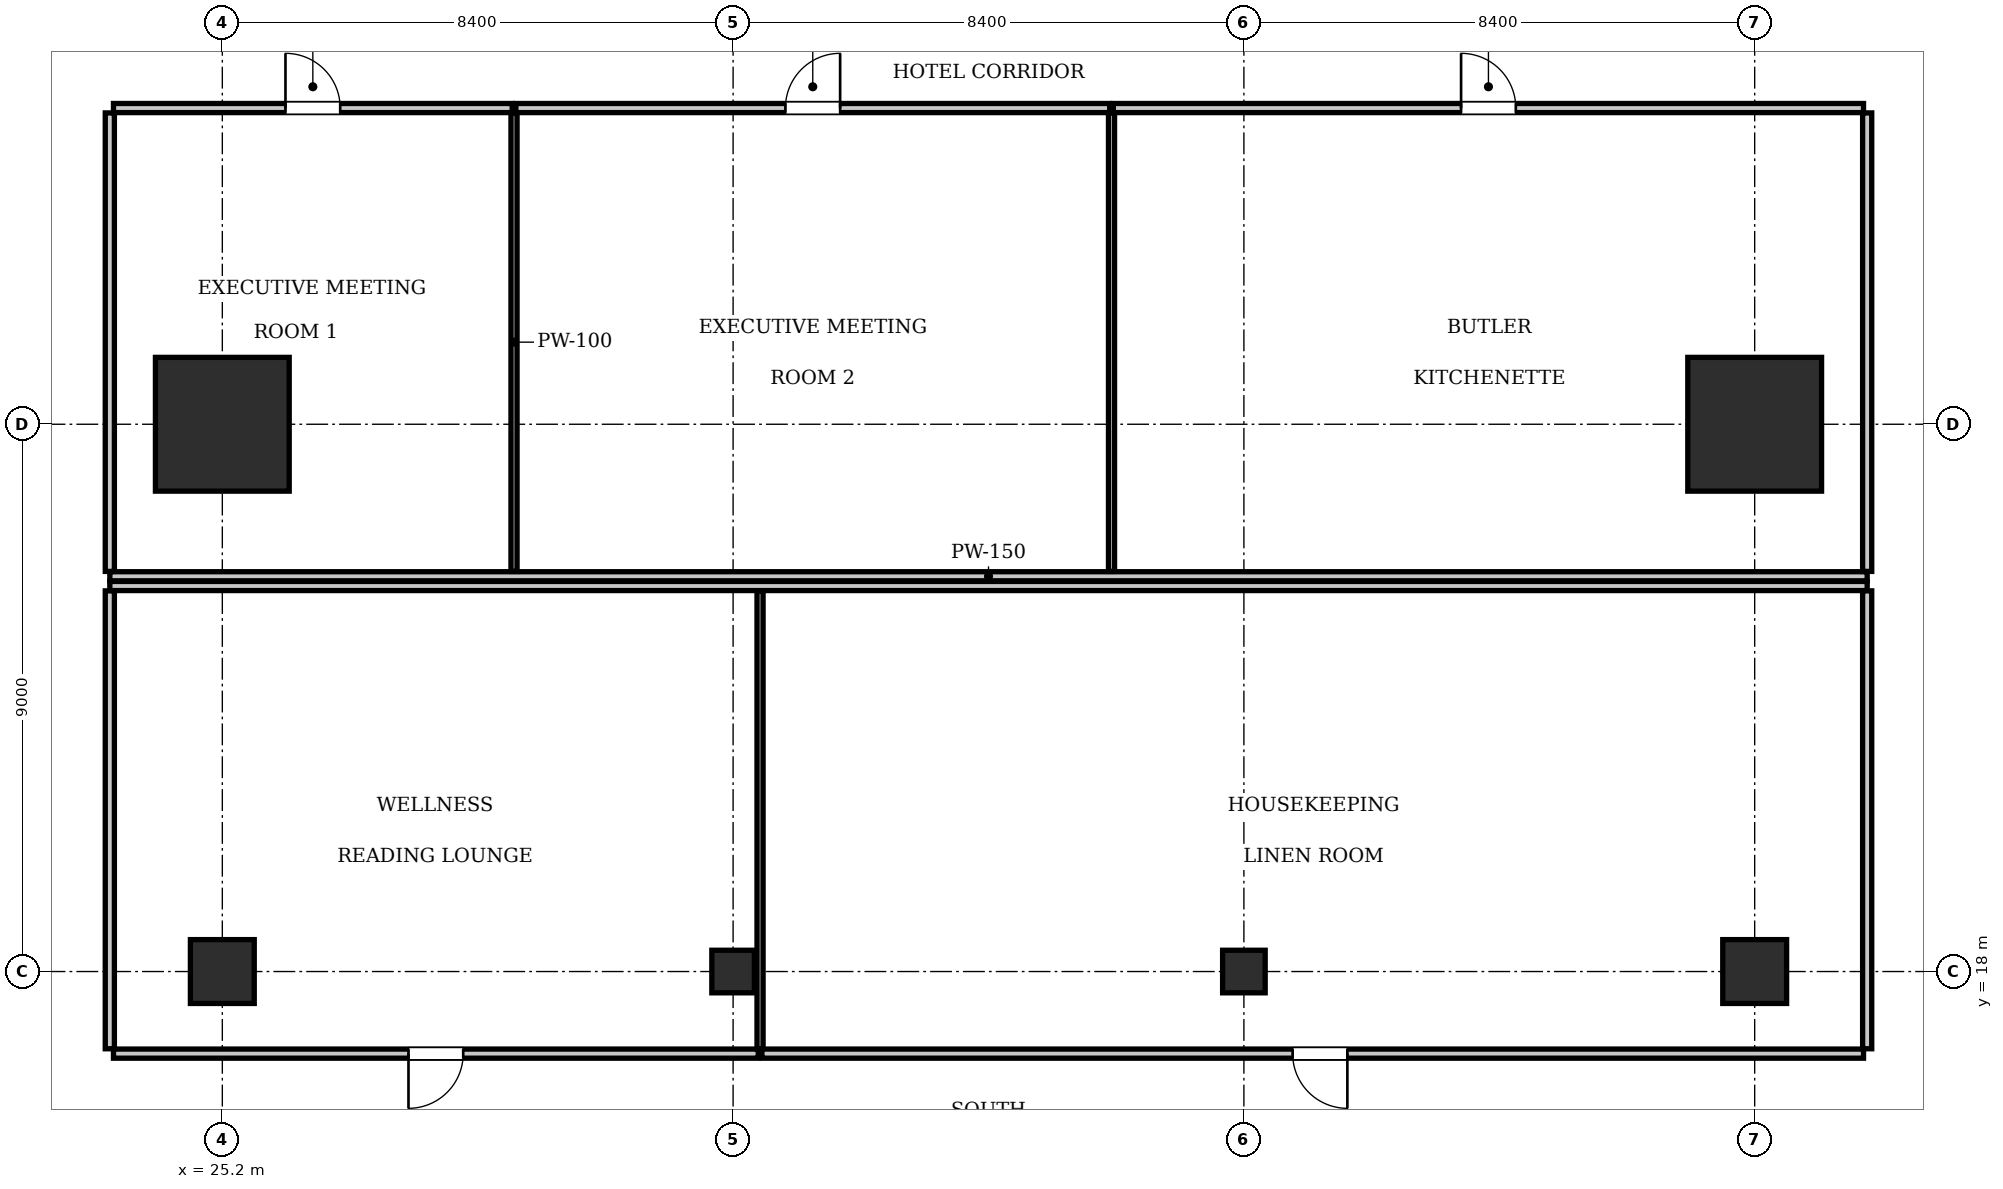
"""IFC4 building model, lengths in metres.
Left out: names, types, materials, properties, quantities, classifications, styles, units other than length and angle.
Written with IfcOpenShell. Run it as: python <this file> out.ifc"""

import sys

from ifc_helpers import new_model, si_unit, direction, frame, frame_2d, origin, origin_2d, place, context, subcontext, project, spatial, rectangle, i_section, extrude, element, fill, save


model = new_model("IFC4")
c1 = context("Model", 3, precision=1e-05, world=origin(), true_north=direction((0.0, 1.0)))
c2 = subcontext(c1, "Body", "Model", "MODEL_VIEW")
j1 = project(units=[si_unit("LENGTHUNIT", "METRE"), si_unit("PLANEANGLEUNIT", "RADIAN")], contexts=[c1])
p1 = place(None, origin())
s1 = spatial("IfcSite", under=j1, at=p1, CompositionType="ELEMENT")
p2 = place(p1, origin())
s2 = spatial("IfcBuilding", under=s1, at=p2, CompositionType="ELEMENT")
p3 = place(p2, frame((0.0, 0.0, 46.2)))
s3 = spatial("IfcBuildingStorey", under=s2, at=p3, CompositionType="ELEMENT", Elevation=46.2)
for number, where, z_axis, x_axis in (
    (1, (25.2, 27.0, 0.0), (0.0, 0.0, 1.0), (1.0, 0.0, 0.0)),
    (2, (50.4, 27.0, 0.0), (0.0, 0.0, 1.0), (1.0, 0.0, 0.0)),
):
    element("IfcColumn", number, at=place(p3, frame(where, z_axis=z_axis, x_axis=x_axis)), inside=s3, PredefinedType="COLUMN", context=c2, shape_type="SweptSolid", body=[
        extrude(rectangle(XDim=2.2, YDim=2.2, at=origin_2d()), origin(), (0.0, 0.0, 1.0), 3.85),
    ])
for number, where, z_axis, x_axis in (
    (3, (25.2, 18.0, 0.0), (0.0, 0.0, 1.0), (1.0, 0.0, 0.0)),
    (4, (50.4, 18.0, 0.0), (0.0, 0.0, 1.0), (1.0, 0.0, 0.0)),
):
    element("IfcColumn", number, at=place(p3, frame(where, z_axis=z_axis, x_axis=x_axis)), inside=s3, PredefinedType="COLUMN", context=c2, shape_type="SweptSolid", body=[
        extrude(rectangle(XDim=1.05, YDim=1.05, at=origin_2d()), origin(), (0.0, 0.0, 1.0), 3.85),
    ])
for number, where, z_axis, x_axis in (
    (5, (33.6, 18.0, 0.0), (0.0, 0.0, 1.0), (1.0, 0.0, 0.0)),
    (6, (42.0, 18.0, 0.0), (0.0, 0.0, 1.0), (1.0, 0.0, 0.0)),
):
    element("IfcColumn", number, at=place(p3, frame(where, z_axis=z_axis, x_axis=x_axis)), inside=s3, PredefinedType="COLUMN", context=c2, shape_type="SweptSolid", body=[
        extrude(i_section(OverallWidth=0.7, OverallDepth=0.7, WebThickness=0.028, FlangeThickness=0.044, at=origin_2d()), origin(), (0.0, 0.0, 1.0), 3.85),
    ])
p4 = place(p3, frame((23.35, 24.5, 0.0), z_axis=(0.0, 0.0, 1.0), x_axis=(1.0, 0.0, 0.0)))
e7 = element("IfcWall", 7, at=p4, inside=s3, PredefinedType="PARTITIONING", context=c2, shape_type="SweptSolid", body=[
    extrude(rectangle(XDim=28.9, YDim=0.15, at=frame_2d((14.45, 0.0))), origin(), (0.0, 0.0, 1.0), 3.61),
])
for number, where, z_axis, x_axis in (
    (8, (23.35, 24.58, 0.0), (0.0, 0.0, 1.0), (0.0, 1.0, 0.0)),
    (9, (52.25, 24.58, 0.0), (0.0, 0.0, 1.0), (0.0, 1.0, 0.0)),
):
    element("IfcWall", number, at=place(p3, frame(where, z_axis=z_axis, x_axis=x_axis)), inside=s3, PredefinedType="PARTITIONING", context=c2, shape_type="SweptSolid", body=[
        extrude(rectangle(XDim=7.54, YDim=0.15, at=frame_2d((3.77, 0.0))), origin(), (0.0, 0.0, 1.0), 3.61),
    ])
p5 = place(p3, frame((23.41, 32.2, 0.0), z_axis=(0.0, 0.0, 1.0), x_axis=(1.0, 0.0, 0.0)))
e10 = element("IfcWall", 10, at=p5, inside=s3, PredefinedType="PARTITIONING", context=c2, shape_type="SweptSolid", body=[
    extrude(rectangle(XDim=6.557, YDim=0.15, at=frame_2d((3.279, 0.0))), origin(), (0.0, 0.0, 1.0), 3.61),
])
p6 = place(p5, frame((2.829, 0.0, 0.0)))
e11 = element("IfcOpeningElement", 11, at=p6, cuts=e10, PredefinedType="OPENING", context=c2, shape_type="SweptSolid", body=[
    extrude(rectangle(XDim=0.9, YDim=2.1, at=frame_2d((0.45, 1.05))), frame((0.0, 0.085, 0.0), z_axis=(0.0, -1.0, 0.0), x_axis=(1.0, 0.0, 0.0)), (0.0, 0.0, 1.0), 0.17),
])
p7 = place(p3, frame((29.997, 24.58, 0.0), z_axis=(0.0, 0.0, 1.0), x_axis=(0.0, 1.0, 0.0)))
e12 = element("IfcWall", 12, at=p7, inside=s3, PredefinedType="PARTITIONING", context=c2, shape_type="SweptSolid", body=[
    extrude(rectangle(XDim=7.54, YDim=0.1, at=frame_2d((3.77, 0.0))), origin(), (0.0, 0.0, 1.0), 3.61),
])
p8 = place(p3, frame((30.027, 32.2, 0.0), z_axis=(0.0, 0.0, 1.0), x_axis=(1.0, 0.0, 0.0)))
e13 = element("IfcWall", 13, at=p8, inside=s3, PredefinedType="PARTITIONING", context=c2, shape_type="SweptSolid", body=[
    extrude(rectangle(XDim=9.766, YDim=0.15, at=frame_2d((4.883, 0.0))), origin(), (0.0, 0.0, 1.0), 3.61),
])
p9 = place(p8, frame((4.433, 0.0, 0.0)))
e14 = element("IfcOpeningElement", 14, at=p9, cuts=e13, PredefinedType="OPENING", context=c2, shape_type="SweptSolid", body=[
    extrude(rectangle(XDim=0.9, YDim=2.1, at=frame_2d((0.45, 1.05))), frame((0.0, 0.085, 0.0), z_axis=(0.0, -1.0, 0.0), x_axis=(1.0, 0.0, 0.0)), (0.0, 0.0, 1.0), 0.17),
])
p10 = place(p3, frame((39.823, 24.58, 0.0), z_axis=(0.0, 0.0, 1.0), x_axis=(0.0, 1.0, 0.0)))
e15 = element("IfcWall", 15, at=p10, inside=s3, PredefinedType="PARTITIONING", context=c2, shape_type="SweptSolid", body=[
    extrude(rectangle(XDim=7.54, YDim=0.1, at=frame_2d((3.77, 0.0))), origin(), (0.0, 0.0, 1.0), 3.61),
])
p11 = place(p3, frame((39.853, 32.2, 0.0), z_axis=(0.0, 0.0, 1.0), x_axis=(1.0, 0.0, 0.0)))
e16 = element("IfcWall", 16, at=p11, inside=s3, PredefinedType="PARTITIONING", context=c2, shape_type="SweptSolid", body=[
    extrude(rectangle(XDim=12.337, YDim=0.15, at=frame_2d((6.168, 0.0))), origin(), (0.0, 0.0, 1.0), 3.61),
])
p12 = place(p11, frame((5.719, 0.0, 0.0)))
e17 = element("IfcOpeningElement", 17, at=p12, cuts=e16, PredefinedType="OPENING", context=c2, shape_type="SweptSolid", body=[
    extrude(rectangle(XDim=0.9, YDim=2.1, at=frame_2d((0.45, 1.05))), frame((0.0, 0.085, 0.0), z_axis=(0.0, -1.0, 0.0), x_axis=(1.0, 0.0, 0.0)), (0.0, 0.0, 1.0), 0.17),
])
p13 = place(p3, frame((23.35, 24.34, 0.0), z_axis=(0.0, 0.0, 1.0), x_axis=(1.0, 0.0, 0.0)))
e18 = element("IfcWall", 18, at=p13, inside=s3, PredefinedType="PARTITIONING", context=c2, shape_type="SweptSolid", body=[
    extrude(rectangle(XDim=28.9, YDim=0.15, at=frame_2d((14.45, 0.0))), origin(), (0.0, 0.0, 1.0), 3.61),
])
for number, where, z_axis, x_axis in (
    (19, (23.35, 16.73, 0.0), (0.0, 0.0, 1.0), (0.0, 1.0, 0.0)),
    (20, (52.25, 16.73, 0.0), (0.0, 0.0, 1.0), (0.0, 1.0, 0.0)),
):
    element("IfcWall", number, at=place(p3, frame(where, z_axis=z_axis, x_axis=x_axis)), inside=s3, PredefinedType="PARTITIONING", context=c2, shape_type="SweptSolid", body=[
        extrude(rectangle(XDim=7.53, YDim=0.15, at=frame_2d((3.765, 0.0))), origin(), (0.0, 0.0, 1.0), 3.61),
    ])
p14 = place(p3, frame((23.41, 16.65, 0.0), z_axis=(0.0, 0.0, 1.0), x_axis=(1.0, 0.0, 0.0)))
e21 = element("IfcWall", 21, at=p14, inside=s3, PredefinedType="PARTITIONING", context=c2, shape_type="SweptSolid", body=[
    extrude(rectangle(XDim=10.603, YDim=0.15, at=frame_2d((5.302, 0.0))), origin(), (0.0, 0.0, 1.0), 3.61),
])
p15 = place(p14, frame((4.852, 0.0, 0.0)))
e22 = element("IfcOpeningElement", 22, at=p15, cuts=e21, PredefinedType="OPENING", context=c2, shape_type="SweptSolid", body=[
    extrude(rectangle(XDim=0.9, YDim=2.1, at=frame_2d((0.45, 1.05))), frame((0.0, 0.085, 0.0), z_axis=(0.0, -1.0, 0.0), x_axis=(1.0, 0.0, 0.0)), (0.0, 0.0, 1.0), 0.17),
])
p16 = place(p3, frame((34.043, 16.73, 0.0), z_axis=(0.0, 0.0, 1.0), x_axis=(0.0, 1.0, 0.0)))
e23 = element("IfcWall", 23, at=p16, inside=s3, PredefinedType="PARTITIONING", context=c2, shape_type="SweptSolid", body=[
    extrude(rectangle(XDim=7.53, YDim=0.1, at=frame_2d((3.765, 0.0))), origin(), (0.0, 0.0, 1.0), 3.61),
])
p17 = place(p3, frame((34.073, 16.65, 0.0), z_axis=(0.0, 0.0, 1.0), x_axis=(1.0, 0.0, 0.0)))
e24 = element("IfcWall", 24, at=p17, inside=s3, PredefinedType="PARTITIONING", context=c2, shape_type="SweptSolid", body=[
    extrude(rectangle(XDim=18.117, YDim=0.15, at=frame_2d((9.059, 0.0))), origin(), (0.0, 0.0, 1.0), 3.61),
])
p18 = place(p17, frame((8.729, 0.0, 0.0)))
e25 = element("IfcOpeningElement", 25, at=p18, cuts=e24, PredefinedType="OPENING", context=c2, shape_type="SweptSolid", body=[
    extrude(rectangle(XDim=0.9, YDim=2.1, at=frame_2d((0.45, 1.05))), frame((0.0, 0.085, 0.0), z_axis=(0.0, -1.0, 0.0), x_axis=(1.0, 0.0, 0.0)), (0.0, 0.0, 1.0), 0.17),
])
p19 = place(p6, origin())
e26 = element("IfcDoor", 26, at=p19, inside=s3, OperationType="SINGLE_SWING_LEFT", PredefinedType="DOOR", context=c2, shape_type="SweptSolid", body=[
    extrude(rectangle(XDim=0.9, YDim=2.1, at=frame_2d((0.45, 1.05))), frame((0.0, 0.025, 0.0), z_axis=(0.0, -1.0, 0.0), x_axis=(1.0, 0.0, 0.0)), (0.0, 0.0, 1.0), 0.05),
])
fill(e11, e26)
p20 = place(p9, origin())
e27 = element("IfcDoor", 27, at=p20, inside=s3, OperationType="SINGLE_SWING_RIGHT", PredefinedType="DOOR", context=c2, shape_type="SweptSolid", body=[
    extrude(rectangle(XDim=0.9, YDim=2.1, at=frame_2d((0.45, 1.05))), frame((0.0, 0.025, 0.0), z_axis=(0.0, -1.0, 0.0), x_axis=(1.0, 0.0, 0.0)), (0.0, 0.0, 1.0), 0.05),
])
fill(e14, e27)
p21 = place(p12, origin())
e28 = element("IfcDoor", 28, at=p21, inside=s3, OperationType="SINGLE_SWING_LEFT", PredefinedType="DOOR", context=c2, shape_type="SweptSolid", body=[
    extrude(rectangle(XDim=0.9, YDim=2.1, at=frame_2d((0.45, 1.05))), frame((0.0, 0.025, 0.0), z_axis=(0.0, -1.0, 0.0), x_axis=(1.0, 0.0, 0.0)), (0.0, 0.0, 1.0), 0.05),
])
fill(e17, e28)
p22 = place(p15, frame((0.9, 0.0, 0.0), z_axis=(0.0, 0.0, 1.0), x_axis=(-1.0, 0.0, 0.0)))
e29 = element("IfcDoor", 29, at=p22, inside=s3, OperationType="SINGLE_SWING_RIGHT", PredefinedType="DOOR", context=c2, shape_type="SweptSolid", body=[
    extrude(rectangle(XDim=0.9, YDim=2.1, at=frame_2d((0.45, 1.05))), frame((0.0, 0.025, 0.0), z_axis=(0.0, -1.0, 0.0), x_axis=(1.0, 0.0, 0.0)), (0.0, 0.0, 1.0), 0.05),
])
fill(e22, e29)
p23 = place(p18, frame((0.9, 0.0, 0.0), z_axis=(0.0, 0.0, 1.0), x_axis=(-1.0, 0.0, 0.0)))
e30 = element("IfcDoor", 30, at=p23, inside=s3, OperationType="SINGLE_SWING_LEFT", PredefinedType="DOOR", context=c2, shape_type="SweptSolid", body=[
    extrude(rectangle(XDim=0.9, YDim=2.1, at=frame_2d((0.45, 1.05))), frame((0.0, 0.025, 0.0), z_axis=(0.0, -1.0, 0.0), x_axis=(1.0, 0.0, 0.0)), (0.0, 0.0, 1.0), 0.05),
])
fill(e25, e30)
save(model, sys.argv[1])
